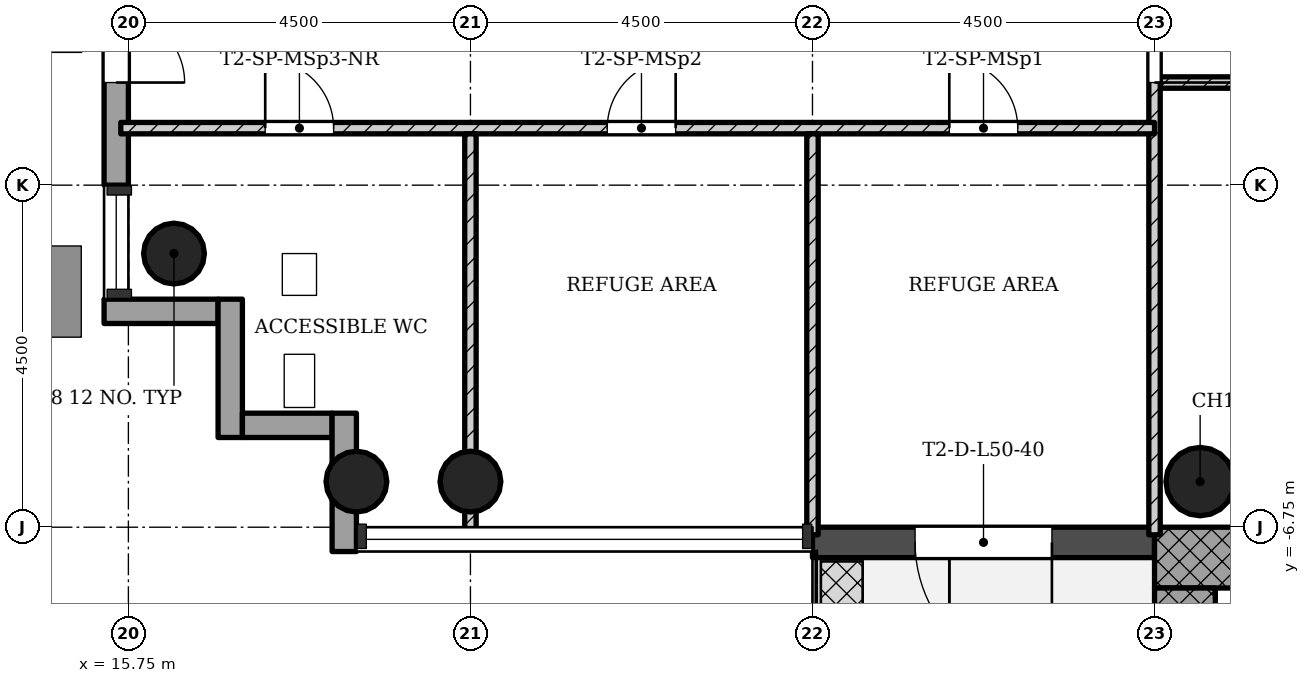
"""IFC4 building model, lengths in metres.
Left out: names, types, materials, properties, quantities, classifications, styles, units other than length and angle.
Written with IfcOpenShell. Run it as: python <this file> out.ifc"""

import sys

from ifc_helpers import new_model, si_unit, direction, frame, frame_2d, origin, origin_2d, place, context, subcontext, project, spatial, rectangle, hollow_circle, extrude, element, fill, save


model = new_model("IFC4")
c1 = context("Model", 3, precision=1e-05, world=origin(), true_north=direction((0.0, 1.0)))
c2 = subcontext(c1, "Body", "Model", "MODEL_VIEW")
j1 = project(units=[si_unit("LENGTHUNIT", "METRE"), si_unit("PLANEANGLEUNIT", "RADIAN")], contexts=[c1])
p1 = place(None, origin())
s1 = spatial("IfcSite", under=j1, at=p1, CompositionType="ELEMENT")
p2 = place(p1, origin())
s2 = spatial("IfcBuilding", under=s1, at=p2, CompositionType="ELEMENT")
p3 = place(p2, frame((0.0, 0.0, 181.3)))
s3 = spatial("IfcBuildingStorey", under=s2, at=p3, CompositionType="ELEMENT", Elevation=181.3)
p4 = place(p3, frame((41.95, -7.15, 0.0), z_axis=(0.0, 0.0, 1.0), x_axis=(-1.0, 0.0, 0.0)))
e1 = element("IfcWall", 1, at=p4, inside=s3, PredefinedType="SHEAR", context=c2, shape_type="SweptSolid", body=[
    extrude(rectangle(XDim=12.7, YDim=0.8, at=frame_2d((6.35, 0.0))), origin(), (0.0, 0.0, 1.0), 4.5),
])
p5 = place(p4, frame((5.05, 0.0, 0.0)))
e2 = element("IfcOpeningElement", 2, at=p5, cuts=e1, PredefinedType="OPENING", context=c2, shape_type="SweptSolid", body=[
    extrude(rectangle(XDim=1.8, YDim=2.1, at=frame_2d((0.9, 1.05))), frame((0.0, 0.41, 0.0), z_axis=(0.0, -1.0, 0.0), x_axis=(1.0, 0.0, 0.0)), (0.0, 0.0, 1.0), 0.82),
])
p6 = place(p3, frame((29.65, -7.55, 0.0), z_axis=(0.0, 0.0, 1.0), x_axis=(0.0, -1.0, 0.0)))
e3 = element("IfcWall", 3, at=p6, inside=s3, PredefinedType="SHEAR", context=c2, shape_type="SweptSolid", body=[
    extrude(rectangle(XDim=8.2, YDim=0.8, at=frame_2d((4.1, 0.0))), origin(), (0.0, 0.0, 1.0), 4.5),
])
for number, where, z_axis, x_axis in (
    (4, (20.25, -6.15, 0.0), (0.0, 0.0, 1.0), (1.0, 0.0, 0.0)),
    (5, (18.75, -6.15, 0.0), (0.0, 0.0, 1.0), (1.0, 0.0, 0.0)),
    (6, (16.35, -3.15, 0.0), (0.0, 0.0, 1.0), (1.0, 0.0, 0.0)),
):
    element("IfcColumn", number, at=place(p3, frame(where, z_axis=z_axis, x_axis=x_axis)), inside=s3, PredefinedType="COLUMN", context=c2, shape_type="SweptSolid", body=[
        extrude(hollow_circle(Radius=0.4, WallThickness=0.028, at=origin_2d()), origin(), (0.0, 0.0, 1.0), 4.5),
    ])
p7 = place(p3, frame((29.85, -6.15, 0.0), z_axis=(0.0, 0.0, 1.0), x_axis=(1.0, 0.0, 0.0)))
e7 = element("IfcColumn", 7, at=p7, inside=s3, PredefinedType="COLUMN", context=c2, shape_type="SweptSolid", body=[
    extrude(hollow_circle(Radius=0.45, WallThickness=0.032, at=origin_2d()), origin(), (0.0, 0.0, 1.0), 4.5),
])
p8 = place(p3, frame((15.59, 2.25, 0.0), z_axis=(0.0, 0.0, 1.0), x_axis=(0.0, -1.0, 0.0)))
e8 = element("IfcWall", 8, at=p8, inside=s3, PredefinedType="STANDARD", context=c2, shape_type="SweptSolid", body=[
    extrude(rectangle(XDim=4.5, YDim=0.32, at=frame_2d((2.25, 0.0))), origin(), (0.0, 0.0, 1.0), 4.2),
])
p9 = place(p8, frame((1.35, 0.0, 0.0)))
e9 = element("IfcOpeningElement", 9, at=p9, cuts=e8, PredefinedType="OPENING", context=c2, shape_type="SweptSolid", body=[
    extrude(rectangle(XDim=1.8, YDim=2.1, at=frame_2d((0.9, 1.05))), frame((0.0, 0.17, 0.0), z_axis=(0.0, -1.0, 0.0), x_axis=(1.0, 0.0, 0.0)), (0.0, 0.0, 1.0), 0.34),
])
p10 = place(p3, frame((15.43, -3.91, -0.3), z_axis=(0.0, 0.0, 1.0), x_axis=(1.0, 0.0, 0.0)))
e10 = element("IfcWall", 10, at=p10, inside=s3, PredefinedType="STANDARD", context=c2, shape_type="SweptSolid", body=[
    extrude(rectangle(XDim=1.5, YDim=0.32, at=frame_2d((0.75, 0.0))), origin(), (0.0, 0.0, 1.0), 4.5),
])
p11 = place(p3, frame((17.09, -3.75, -0.3), z_axis=(0.0, 0.0, 1.0), x_axis=(0.0, -1.0, 0.0)))
e11 = element("IfcWall", 11, at=p11, inside=s3, PredefinedType="STANDARD", context=c2, shape_type="SweptSolid", body=[
    extrude(rectangle(XDim=1.82, YDim=0.32, at=frame_2d((0.91, 0.0))), origin(), (0.0, 0.0, 1.0), 4.5),
])
p12 = place(p3, frame((17.25, -5.41, -0.3), z_axis=(0.0, 0.0, 1.0), x_axis=(1.0, 0.0, 0.0)))
e12 = element("IfcWall", 12, at=p12, inside=s3, PredefinedType="STANDARD", context=c2, shape_type="SweptSolid", body=[
    extrude(rectangle(XDim=1.18, YDim=0.32, at=frame_2d((0.59, 0.0))), origin(), (0.0, 0.0, 1.0), 4.5),
])
p13 = place(p3, frame((18.59, -5.25, -0.3), z_axis=(0.0, 0.0, 1.0), x_axis=(0.0, -1.0, 0.0)))
e13 = element("IfcWall", 13, at=p13, inside=s3, PredefinedType="STANDARD", context=c2, shape_type="SweptSolid", body=[
    extrude(rectangle(XDim=1.82, YDim=0.32, at=frame_2d((0.91, 0.0))), origin(), (0.0, 0.0, 1.0), 4.5),
])
p14 = place(p3, frame((24.75, -6.95, -0.02), z_axis=(0.0, 0.0, 1.0), x_axis=(1.0, 0.0, 0.0)))
e14 = element("IfcWall", 14, at=p14, inside=s3, PredefinedType="STANDARD", context=c2, shape_type="SweptSolid", body=[
    extrude(rectangle(XDim=4.5, YDim=0.4, at=frame_2d((2.25, 0.0))), origin(), (0.0, 0.0, 1.0), 4.22),
])
p15 = place(p14, frame((1.35, 0.0, 0.02)))
e15 = element("IfcOpeningElement", 15, at=p15, cuts=e14, PredefinedType="OPENING", context=c2, shape_type="SweptSolid", body=[
    extrude(rectangle(XDim=1.8, YDim=2.1, at=frame_2d((0.9, 1.05))), frame((0.0, 0.21, 0.0), z_axis=(0.0, -1.0, 0.0), x_axis=(1.0, 0.0, 0.0)), (0.0, 0.0, 1.0), 0.42),
])
p16 = place(p3, frame((35.025, -0.9, 0.0), z_axis=(0.0, 0.0, 1.0), x_axis=(-1.0, 0.0, 0.0)))
e16 = element("IfcWall", 16, at=p16, inside=s3, PredefinedType="PARTITIONING", context=c2, shape_type="SweptSolid", body=[
    extrude(rectangle(XDim=5.7, YDim=0.15, at=frame_2d((2.85, 0.0))), origin(), (0.0, 0.0, 1.0), 4.08),
])
p17 = place(p3, frame((29.25, -6.85, 0.0), z_axis=(0.0, 0.0, 1.0), x_axis=(0.0, 1.0, 0.0)))
e17 = element("IfcWall", 17, at=p17, inside=s3, PredefinedType="PARTITIONING", context=c2, shape_type="SweptSolid", body=[
    extrude(rectangle(XDim=13.7, YDim=0.15, at=frame_2d((6.85, 0.0))), origin(), (0.0, 0.0, 1.0), 4.08),
])
p18 = place(p17, frame((5.95, 0.0, 0.0)))
e18 = element("IfcOpeningElement", 18, at=p18, cuts=e17, PredefinedType="OPENING", context=c2, shape_type="SweptSolid", body=[
    extrude(rectangle(XDim=1.8, YDim=2.1, at=frame_2d((0.9, 1.05))), frame((0.0, 0.085, 0.0), z_axis=(0.0, -1.0, 0.0), x_axis=(1.0, 0.0, 0.0)), (0.0, 0.0, 1.0), 0.17),
])
p19 = place(p3, frame((29.25, -1.5, 0.0), z_axis=(0.0, 0.0, 1.0), x_axis=(-1.0, 0.0, 0.0)))
e19 = element("IfcWall", 19, at=p19, inside=s3, PredefinedType="PARTITIONING", context=c2, shape_type="SweptSolid", body=[
    extrude(rectangle(XDim=13.6, YDim=0.15, at=frame_2d((6.8, 0.0))), origin(), (0.0, 0.0, 1.0), 4.08),
])
p20 = place(p19, frame((1.8, 0.0, 0.0)))
e20 = element("IfcOpeningElement", 20, at=p20, cuts=e19, PredefinedType="OPENING", context=c2, shape_type="SweptSolid", body=[
    extrude(rectangle(XDim=0.9, YDim=2.1, at=frame_2d((0.45, 1.05))), frame((0.0, 0.085, 0.0), z_axis=(0.0, -1.0, 0.0), x_axis=(1.0, 0.0, 0.0)), (0.0, 0.0, 1.0), 0.17),
])
p21 = place(p19, frame((6.3, 0.0, 0.0)))
e21 = element("IfcOpeningElement", 21, at=p21, cuts=e19, PredefinedType="OPENING", context=c2, shape_type="SweptSolid", body=[
    extrude(rectangle(XDim=0.9, YDim=2.1, at=frame_2d((0.45, 1.05))), frame((0.0, 0.085, 0.0), z_axis=(0.0, -1.0, 0.0), x_axis=(1.0, 0.0, 0.0)), (0.0, 0.0, 1.0), 0.17),
])
p22 = place(p19, frame((10.8, 0.0, 0.0)))
e22 = element("IfcOpeningElement", 22, at=p22, cuts=e19, PredefinedType="OPENING", context=c2, shape_type="SweptSolid", body=[
    extrude(rectangle(XDim=0.9, YDim=2.1, at=frame_2d((0.45, 1.05))), frame((0.0, 0.085, 0.0), z_axis=(0.0, -1.0, 0.0), x_axis=(1.0, 0.0, 0.0)), (0.0, 0.0, 1.0), 0.17),
])
for number, where, z_axis, x_axis in (
    (23, (24.75, -1.575, 0.0), (0.0, 0.0, 1.0), (0.0, -1.0, 0.0)),
    (24, (20.25, -1.575, 0.0), (0.0, 0.0, 1.0), (0.0, -1.0, 0.0)),
):
    element("IfcWall", number, at=place(p3, frame(where, z_axis=z_axis, x_axis=x_axis)), inside=s3, PredefinedType="PARTITIONING", context=c2, shape_type="SweptSolid", body=[
        extrude(rectangle(XDim=5.275, YDim=0.15, at=frame_2d((2.638, 0.0))), origin(), (0.0, 0.0, 1.0), 4.08),
    ])
p23 = place(p9, origin())
e25 = element("IfcDoor", 25, at=p23, inside=s3, OperationType="DOUBLE_DOOR_SINGLE_SWING", PredefinedType="DOOR", context=c2, shape_type="SweptSolid", body=[
    extrude(rectangle(XDim=1.8, YDim=2.1, at=frame_2d((0.9, 1.05))), frame((0.0, 0.025, 0.0), z_axis=(0.0, -1.0, 0.0), x_axis=(1.0, 0.0, 0.0)), (0.0, 0.0, 1.0), 0.05),
])
fill(e9, e25)
p24 = place(p15, origin())
e26 = element("IfcDoor", 26, at=p24, inside=s3, OperationType="SINGLE_SWING_RIGHT", PredefinedType="DOOR", context=c2, shape_type="SweptSolid", body=[
    extrude(rectangle(XDim=1.8, YDim=2.1, at=frame_2d((0.9, 1.05))), frame((0.0, 0.025, 0.0), z_axis=(0.0, -1.0, 0.0), x_axis=(1.0, 0.0, 0.0)), (0.0, 0.0, 1.0), 0.05),
])
fill(e15, e26)
p25 = place(p18, origin())
e27 = element("IfcDoor", 27, at=p25, inside=s3, OperationType="SINGLE_SWING_LEFT", PredefinedType="DOOR", context=c2, shape_type="SweptSolid", body=[
    extrude(rectangle(XDim=1.8, YDim=2.1, at=frame_2d((0.9, 1.05))), frame((0.0, 0.025, 0.0), z_axis=(0.0, -1.0, 0.0), x_axis=(1.0, 0.0, 0.0)), (0.0, 0.0, 1.0), 0.05),
])
fill(e18, e27)
p26 = place(p20, origin())
e28 = element("IfcDoor", 28, at=p26, inside=s3, OperationType="SINGLE_SWING_RIGHT", PredefinedType="DOOR", context=c2, shape_type="SweptSolid", body=[
    extrude(rectangle(XDim=0.9, YDim=2.1, at=frame_2d((0.45, 1.05))), frame((0.0, 0.025, 0.0), z_axis=(0.0, -1.0, 0.0), x_axis=(1.0, 0.0, 0.0)), (0.0, 0.0, 1.0), 0.05),
])
fill(e20, e28)
p27 = place(p21, origin())
e29 = element("IfcDoor", 29, at=p27, inside=s3, OperationType="SINGLE_SWING_LEFT", PredefinedType="DOOR", context=c2, shape_type="SweptSolid", body=[
    extrude(rectangle(XDim=0.9, YDim=2.1, at=frame_2d((0.45, 1.05))), frame((0.0, 0.025, 0.0), z_axis=(0.0, -1.0, 0.0), x_axis=(1.0, 0.0, 0.0)), (0.0, 0.0, 1.0), 0.05),
])
fill(e21, e29)
p28 = place(p22, origin())
e30 = element("IfcDoor", 30, at=p28, inside=s3, OperationType="SINGLE_SWING_RIGHT", PredefinedType="DOOR", context=c2, shape_type="SweptSolid", body=[
    extrude(rectangle(XDim=0.9, YDim=2.1, at=frame_2d((0.45, 1.05))), frame((0.0, 0.025, 0.0), z_axis=(0.0, -1.0, 0.0), x_axis=(1.0, 0.0, 0.0)), (0.0, 0.0, 1.0), 0.05),
])
fill(e22, e30)
save(model, sys.argv[1])
